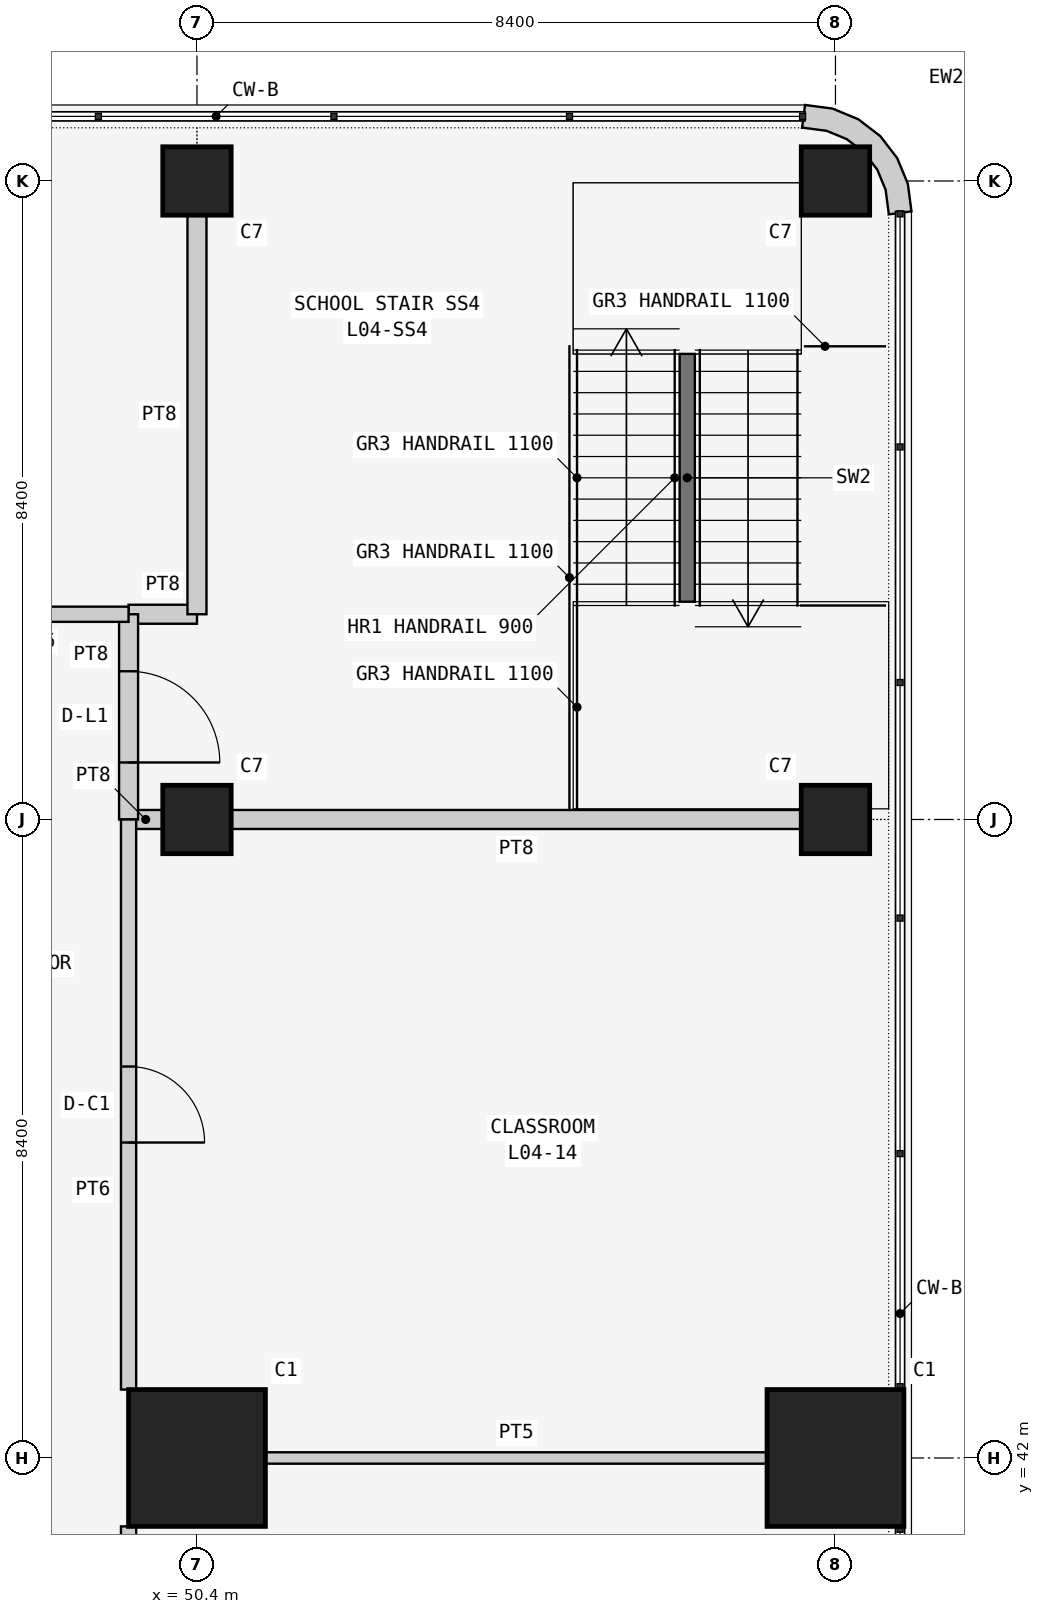
"""IFC4 building model, lengths in metres.
Left out: names, types, materials, properties, quantities, classifications, styles, units other than length and angle.
Written with IfcOpenShell. Run it as: python <this file> out.ifc"""

import sys

from ifc_helpers import new_model, si_unit, direction, frame, frame_2d, origin, origin_2d, place, context, subcontext, project, spatial, polyline, rectangle, outline, extrude, element, fill, save


model = new_model("IFC4")
c1 = context("Model", 3, precision=1e-05, world=origin(), true_north=direction((0.0, 1.0)))
c2 = subcontext(c1, "Body", "Model", "MODEL_VIEW")
j1 = project(units=[si_unit("LENGTHUNIT", "METRE"), si_unit("PLANEANGLEUNIT", "RADIAN")], contexts=[c1])
p1 = place(None, origin())
s1 = spatial("IfcSite", under=j1, at=p1, CompositionType="ELEMENT")
p2 = place(p1, origin())
s2 = spatial("IfcBuilding", under=s1, at=p2, CompositionType="ELEMENT")
p3 = place(p2, frame((0.0, 0.0, 19.5)))
s3 = spatial("IfcBuildingStorey", under=s2, at=p3, CompositionType="ELEMENT", Elevation=19.5)
p4 = place(p3, frame((50.4, 42.0, 0.0), z_axis=(0.0, 0.0, 1.0), x_axis=(1.0, 0.0, 0.0)))
e1 = element("IfcColumn", 1, at=p4, inside=s3, PredefinedType="COLUMN", context=c2, shape_type="SweptSolid", body=[
    extrude(rectangle(XDim=1.8, YDim=1.8, at=origin_2d()), origin(), (0.0, 0.0, 1.0), 4.5),
])
for number, where, z_axis, x_axis in (
    (2, (50.4, 50.4, 0.0), (0.0, 0.0, 1.0), (1.0, 0.0, 0.0)),
    (3, (50.4, 58.8, 0.0), (0.0, 0.0, 1.0), (1.0, 0.0, 0.0)),
):
    element("IfcColumn", number, at=place(p3, frame(where, z_axis=z_axis, x_axis=x_axis)), inside=s3, PredefinedType="COLUMN", context=c2, shape_type="SweptSolid", body=[
        extrude(rectangle(XDim=0.9, YDim=0.9, at=origin_2d()), origin(), (0.0, 0.0, 1.0), 4.5),
    ])
p5 = place(p3, frame((58.8, 42.0, 0.0), z_axis=(0.0, 0.0, 1.0), x_axis=(1.0, 0.0, 0.0)))
e4 = element("IfcColumn", 4, at=p5, inside=s3, PredefinedType="COLUMN", context=c2, shape_type="SweptSolid", body=[
    extrude(rectangle(XDim=1.8, YDim=1.8, at=origin_2d()), origin(), (0.0, 0.0, 1.0), 4.5),
])
for number, where, z_axis, x_axis in (
    (5, (58.8, 50.4, 0.0), (0.0, 0.0, 1.0), (1.0, 0.0, 0.0)),
    (6, (58.8, 58.8, 0.0), (0.0, 0.0, 1.0), (1.0, 0.0, 0.0)),
):
    element("IfcColumn", number, at=place(p3, frame(where, z_axis=z_axis, x_axis=x_axis)), inside=s3, PredefinedType="COLUMN", context=c2, shape_type="SweptSolid", body=[
        extrude(rectangle(XDim=0.9, YDim=0.9, at=origin_2d()), origin(), (0.0, 0.0, 1.0), 4.5),
    ])
p6 = place(p3, frame((59.648, 58.355, 0.0), z_axis=(0.0, 0.0, 1.0), x_axis=(0.707106781187, 0.707106781187, 0.0)))
e7 = element("IfcWall", 7, at=p6, inside=s3, PredefinedType="SOLIDWALL", context=c2, shape_type="SweptSolid", body=[
    extrude(outline(polyline([(0.139, 1.904), (-0.101, 1.72), (-0.087, 1.706), (0.1, 1.463), (0.209, 1.198), (0.246, 0.914), (0.209, 0.63), (0.1, 0.365), (-0.087, 0.122), (-0.101, 0.108), (0.139, -0.076), (0.362, 0.214), (0.502, 0.552), (0.549, 0.914), (0.502, 1.276), (0.362, 1.614), (0.139, 1.904)])), origin(), (0.0, 0.0, 1.0), 4.3),
])
p7 = place(p3, frame((49.95, 50.4, 0.0), z_axis=(0.0, 0.0, 1.0), x_axis=(-1.0, 0.0, 0.0)))
e8 = element("IfcWall", 8, at=p7, inside=s3, PredefinedType="SOLIDWALL", context=c2, shape_type="SweptSolid", body=[
    extrude(rectangle(XDim=0.45, YDim=0.25, at=frame_2d((0.225, 0.0))), origin(), (0.0, 0.0, 1.0), 3.543),
])
p8 = place(p3, frame((58.35, 50.4, 0.0), z_axis=(0.0, 0.0, 1.0), x_axis=(-1.0, 0.0, 0.0)))
e9 = element("IfcWall", 9, at=p8, inside=s3, PredefinedType="SOLIDWALL", context=c2, shape_type="SweptSolid", body=[
    extrude(rectangle(XDim=7.5, YDim=0.25, at=frame_2d((3.75, 0.0))), origin(), (0.0, 0.0, 1.0), 3.543),
])
p9 = place(p3, frame((49.5, 53.1, 0.0), z_axis=(0.0, 0.0, 1.0), x_axis=(1.0, 0.0, 0.0)))
e10 = element("IfcWall", 10, at=p9, inside=s3, PredefinedType="SOLIDWALL", context=c2, shape_type="SweptSolid", body=[
    extrude(rectangle(XDim=0.9, YDim=0.25, at=frame_2d((0.45, 0.0))), origin(), (0.0, 0.0, 1.0), 4.3),
])
p10 = place(p3, frame((50.4, 53.1, 0.0), z_axis=(0.0, 0.0, 1.0), x_axis=(0.0, 1.0, 0.0)))
e11 = element("IfcWall", 11, at=p10, inside=s3, PredefinedType="SOLIDWALL", context=c2, shape_type="SweptSolid", body=[
    extrude(rectangle(XDim=5.25, YDim=0.25, at=frame_2d((2.625, 0.0))), origin(), (0.0, 0.0, 1.0), 3.543),
])
p11 = place(p3, frame((49.5, 50.4, 0.0), z_axis=(0.0, 0.0, 1.0), x_axis=(0.0, 1.0, 0.0)))
e12 = element("IfcWall", 12, at=p11, inside=s3, PredefinedType="SOLIDWALL", context=c2, shape_type="SweptSolid", body=[
    extrude(rectangle(XDim=2.7, YDim=0.25, at=frame_2d((1.35, 0.0))), origin(), (0.0, 0.0, 1.0), 4.3),
])
p12 = place(p11, frame((0.75, 0.0, 0.0)))
e13 = element("IfcOpeningElement", 13, at=p12, cuts=e12, PredefinedType="OPENING", context=c2, shape_type="SweptSolid", body=[
    extrude(rectangle(XDim=1.2, YDim=2.1, at=frame_2d((0.6, 1.05))), frame((0.0, 0.135, 0.0), z_axis=(0.0, -1.0, 0.0), x_axis=(1.0, 0.0, 0.0)), (0.0, 0.0, 1.0), 0.27),
])
p13 = place(p3, frame((51.3, 42.0, 0.0), z_axis=(0.0, 0.0, 1.0), x_axis=(1.0, 0.0, 0.0)))
e14 = element("IfcWall", 14, at=p13, inside=s3, PredefinedType="PARTITIONING", context=c2, shape_type="SweptSolid", body=[
    extrude(rectangle(XDim=6.6, YDim=0.15, at=frame_2d((3.3, 0.0))), origin(), (0.0, 0.0, 1.0), 3.543),
])
p14 = place(p3, frame((49.5, 34.5, 0.0), z_axis=(0.0, 0.0, 1.0), x_axis=(0.0, 1.0, 0.0)))
e15 = element("IfcWall", 15, at=p14, inside=s3, PredefinedType="PARTITIONING", context=c2, shape_type="SweptSolid", body=[
    extrude(rectangle(XDim=6.6, YDim=0.2, at=frame_2d((3.3, 0.0))), origin(), (0.0, 0.0, 1.0), 4.3),
])
p15 = place(p14, frame((2.8, 0.0, 0.0)))
e16 = element("IfcOpeningElement", 16, at=p15, cuts=e15, PredefinedType="OPENING", context=c2, shape_type="SweptSolid", body=[
    extrude(rectangle(XDim=1.0, YDim=2.1, at=frame_2d((0.5, 1.05))), frame((0.0, 0.11, 0.0), z_axis=(0.0, -1.0, 0.0), x_axis=(1.0, 0.0, 0.0)), (0.0, 0.0, 1.0), 0.22),
])
p16 = place(p3, frame((49.5, 42.9, 0.0), z_axis=(0.0, 0.0, 1.0), x_axis=(0.0, 1.0, 0.0)))
e17 = element("IfcWall", 17, at=p16, inside=s3, PredefinedType="PARTITIONING", context=c2, shape_type="SweptSolid", body=[
    extrude(rectangle(XDim=7.5, YDim=0.2, at=frame_2d((3.75, 0.0))), origin(), (0.0, 0.0, 1.0), 4.3),
])
p17 = place(p16, frame((3.25, 0.0, 0.0)))
e18 = element("IfcOpeningElement", 18, at=p17, cuts=e17, PredefinedType="OPENING", context=c2, shape_type="SweptSolid", body=[
    extrude(rectangle(XDim=1.0, YDim=2.1, at=frame_2d((0.5, 1.05))), frame((0.0, 0.11, 0.0), z_axis=(0.0, -1.0, 0.0), x_axis=(1.0, 0.0, 0.0)), (0.0, 0.0, 1.0), 0.22),
])
p18 = place(p3, frame((49.5, 53.1, 0.0), z_axis=(0.0, 0.0, 1.0), x_axis=(-1.0, 0.0, 0.0)))
e19 = element("IfcWall", 19, at=p18, inside=s3, PredefinedType="PARTITIONING", context=c2, shape_type="SweptSolid", body=[
    extrude(rectangle(XDim=2.4, YDim=0.2, at=frame_2d((1.2, 0.0))), origin(), (0.0, 0.0, 1.0), 4.3),
])
p19 = place(p3, frame((56.85, 56.525, 0.0), z_axis=(0.0, 0.0, 1.0), x_axis=(0.0, -1.0, 0.0)))
e20 = element("IfcWall", 20, at=p19, inside=s3, PredefinedType="SOLIDWALL", context=c2, shape_type="SweptSolid", body=[
    extrude(rectangle(XDim=3.26, YDim=0.2, at=frame_2d((1.63, 0.0))), origin(), (0.0, 0.0, 1.0), 4.5),
])
p20 = place(p12, frame((1.2, 0.0, 0.0), z_axis=(0.0, 0.0, 1.0), x_axis=(-1.0, 0.0, 0.0)))
e21 = element("IfcDoor", 21, at=p20, inside=s3, OperationType="SINGLE_SWING_RIGHT", PredefinedType="DOOR", context=c2, shape_type="SweptSolid", body=[
    extrude(rectangle(XDim=1.2, YDim=2.1, at=frame_2d((0.6, 1.05))), frame((0.0, 0.025, 0.0), z_axis=(0.0, -1.0, 0.0), x_axis=(1.0, 0.0, 0.0)), (0.0, 0.0, 1.0), 0.05),
])
fill(e13, e21)
p21 = place(p17, frame((1.0, 0.0, 0.0), z_axis=(0.0, 0.0, 1.0), x_axis=(-1.0, 0.0, 0.0)))
e22 = element("IfcDoor", 22, at=p21, inside=s3, OperationType="SINGLE_SWING_RIGHT", PredefinedType="DOOR", context=c2, shape_type="SweptSolid", body=[
    extrude(rectangle(XDim=1.0, YDim=2.1, at=frame_2d((0.5, 1.05))), frame((0.0, 0.025, 0.0), z_axis=(0.0, -1.0, 0.0), x_axis=(1.0, 0.0, 0.0)), (0.0, 0.0, 1.0), 0.05),
])
fill(e18, e22)
save(model, sys.argv[1])
